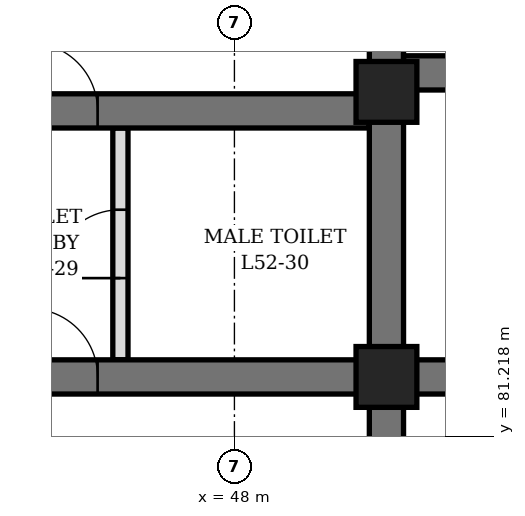
"""IFC4 building model, lengths in metres.
Left out: names, types, materials, properties, quantities, classifications, styles, units other than length and angle.
Written with IfcOpenShell. Run it as: python <this file> out.ifc"""

import sys

from ifc_helpers import new_model, si_unit, direction, frame, frame_2d, origin, origin_2d, place, context, subcontext, project, spatial, rectangle, hollow_rectangle, extrude, element, fill, save


model = new_model("IFC4")
c1 = context("Model", 3, precision=1e-05, world=origin(), true_north=direction((0.0, 1.0)))
c2 = subcontext(c1, "Body", "Model", "MODEL_VIEW")
j1 = project(units=[si_unit("LENGTHUNIT", "METRE"), si_unit("PLANEANGLEUNIT", "RADIAN")], contexts=[c1])
p1 = place(None, origin())
s1 = spatial("IfcSite", under=j1, at=p1, CompositionType="ELEMENT")
p2 = place(p1, origin())
s2 = spatial("IfcBuilding", under=s1, at=p2, CompositionType="ELEMENT")
p3 = place(p2, frame((0.0, 0.0, 231.7)))
s3 = spatial("IfcBuildingStorey", under=s2, at=p3, CompositionType="ELEMENT", Elevation=231.7)
p4 = place(p3, frame((50.0, 71.6, 0.0), z_axis=(0.0, 0.0, 1.0), x_axis=(0.0, 1.0, 0.0)))
e1 = element("IfcWall", 1, at=p4, inside=s3, PredefinedType="SHEAR", context=c2, shape_type="SweptSolid", body=[
    extrude(rectangle(XDim=16.8, YDim=0.45, at=frame_2d((8.4, 0.0))), origin(), (0.0, 0.0, 1.0), 4.2),
])
p5 = place(p4, frame((7.5, 0.0, 0.0)))
e2 = element("IfcOpeningElement", 2, at=p5, cuts=e1, PredefinedType="OPENING", context=c2, shape_type="SweptSolid", body=[
    extrude(rectangle(XDim=1.8, YDim=2.4, at=frame_2d((0.9, 1.2))), frame((0.0, 0.235, 0.0), z_axis=(0.0, -1.0, 0.0), x_axis=(1.0, 0.0, 0.0)), (0.0, 0.0, 1.0), 0.47),
])
p6 = place(p3, frame((44.6, 82.0, 0.0), z_axis=(0.0, 0.0, 1.0), x_axis=(1.0, 0.0, 0.0)))
e3 = element("IfcWall", 3, at=p6, inside=s3, PredefinedType="SHEAR", context=c2, shape_type="SweptSolid", body=[
    extrude(rectangle(XDim=5.175, YDim=0.45, at=frame_2d((2.587, 0.0))), origin(), (0.0, 0.0, 1.0), 4.2),
])
p7 = place(p6, frame((0.7, 0.0, 0.0)))
e4 = element("IfcOpeningElement", 4, at=p7, cuts=e3, PredefinedType="OPENING", context=c2, shape_type="SweptSolid", body=[
    extrude(rectangle(XDim=0.9, YDim=2.1, at=frame_2d((0.45, 1.05))), frame((0.0, 0.235, 0.0), z_axis=(0.0, -1.0, 0.0), x_axis=(1.0, 0.0, 0.0)), (0.0, 0.0, 1.0), 0.47),
])
p8 = place(p3, frame((44.6, 85.5, 0.0), z_axis=(0.0, 0.0, 1.0), x_axis=(1.0, 0.0, 0.0)))
e5 = element("IfcWall", 5, at=p8, inside=s3, PredefinedType="SHEAR", context=c2, shape_type="SweptSolid", body=[
    extrude(rectangle(XDim=5.175, YDim=0.45, at=frame_2d((2.587, 0.0))), origin(), (0.0, 0.0, 1.0), 4.2),
])
p9 = place(p8, frame((0.7, 0.0, 0.0)))
e6 = element("IfcOpeningElement", 6, at=p9, cuts=e5, PredefinedType="OPENING", context=c2, shape_type="SweptSolid", body=[
    extrude(rectangle(XDim=0.9, YDim=2.1, at=frame_2d((0.45, 1.05))), frame((0.0, 0.235, 0.0), z_axis=(0.0, -1.0, 0.0), x_axis=(1.0, 0.0, 0.0)), (0.0, 0.0, 1.0), 0.47),
])
p10 = place(p3, frame((50.225, 82.0, 0.0), z_axis=(0.0, 0.0, 1.0), x_axis=(1.0, 0.0, 0.0)))
e7 = element("IfcWall", 7, at=p10, inside=s3, PredefinedType="SHEAR", context=c2, shape_type="SweptSolid", body=[
    extrude(rectangle(XDim=11.55, YDim=0.45, at=frame_2d((5.775, 0.0))), origin(), (0.0, 0.0, 1.0), 4.2),
])
p11 = place(p10, frame((0.825, 0.0, 0.0)))
e8 = element("IfcOpeningElement", 8, at=p11, cuts=e7, PredefinedType="OPENING", context=c2, shape_type="SweptSolid", body=[
    extrude(rectangle(XDim=0.9, YDim=2.1, at=frame_2d((0.45, 1.05))), frame((0.0, 0.235, 0.0), z_axis=(0.0, -1.0, 0.0), x_axis=(1.0, 0.0, 0.0)), (0.0, 0.0, 1.0), 0.47),
])
p12 = place(p10, frame((3.825, 0.0, 0.0)))
e9 = element("IfcOpeningElement", 9, at=p12, cuts=e7, PredefinedType="OPENING", context=c2, shape_type="SweptSolid", body=[
    extrude(rectangle(XDim=0.9, YDim=2.1, at=frame_2d((0.45, 1.05))), frame((0.0, 0.235, 0.0), z_axis=(0.0, -1.0, 0.0), x_axis=(1.0, 0.0, 0.0)), (0.0, 0.0, 1.0), 0.47),
])
p13 = place(p10, frame((6.825, 0.0, 0.0)))
e10 = element("IfcOpeningElement", 10, at=p13, cuts=e7, PredefinedType="OPENING", context=c2, shape_type="SweptSolid", body=[
    extrude(rectangle(XDim=0.9, YDim=2.1, at=frame_2d((0.45, 1.05))), frame((0.0, 0.235, 0.0), z_axis=(0.0, -1.0, 0.0), x_axis=(1.0, 0.0, 0.0)), (0.0, 0.0, 1.0), 0.47),
])
p14 = place(p10, frame((9.825, 0.0, 0.0)))
e11 = element("IfcOpeningElement", 11, at=p14, cuts=e7, PredefinedType="OPENING", context=c2, shape_type="SweptSolid", body=[
    extrude(rectangle(XDim=0.9, YDim=2.1, at=frame_2d((0.45, 1.05))), frame((0.0, 0.235, 0.0), z_axis=(0.0, -1.0, 0.0), x_axis=(1.0, 0.0, 0.0)), (0.0, 0.0, 1.0), 0.47),
])
p15 = place(p3, frame((50.225, 86.0, 0.0), z_axis=(0.0, 0.0, 1.0), x_axis=(1.0, 0.0, 0.0)))
e12 = element("IfcWall", 12, at=p15, inside=s3, PredefinedType="SHEAR", context=c2, shape_type="SweptSolid", body=[
    extrude(rectangle(XDim=11.55, YDim=0.45, at=frame_2d((5.775, 0.0))), origin(), (0.0, 0.0, 1.0), 4.2),
])
for number, where, z_axis, x_axis in (
    (13, (50.0, 82.0, 0.0), (0.0, 0.0, 1.0), (1.0, 0.0, 0.0)),
    (14, (50.0, 85.75, 0.0), (0.0, 0.0, 1.0), (1.0, 0.0, 0.0)),
):
    element("IfcColumn", number, at=place(p3, frame(where, z_axis=z_axis, x_axis=x_axis)), inside=s3, PredefinedType="COLUMN", context=c2, shape_type="SweptSolid", body=[
        extrude(hollow_rectangle(XDim=0.8, YDim=0.8, WallThickness=0.1, at=origin_2d()), origin(), (0.0, 0.0, 1.0), 4.2),
    ])
p16 = place(p3, frame((46.5, 82.225, 0.0), z_axis=(0.0, 0.0, 1.0), x_axis=(0.0, 1.0, 0.0)))
e15 = element("IfcWall", 15, at=p16, inside=s3, PredefinedType="PARTITIONING", context=c2, shape_type="SweptSolid", body=[
    extrude(rectangle(XDim=3.05, YDim=0.2, at=frame_2d((1.525, 0.0))), origin(), (0.0, 0.0, 1.0), 4.04),
])
p17 = place(p16, frame((1.075, 0.0, 0.0)))
e16 = element("IfcOpeningElement", 16, at=p17, cuts=e15, PredefinedType="OPENING", context=c2, shape_type="SweptSolid", body=[
    extrude(rectangle(XDim=0.9, YDim=2.1, at=frame_2d((0.45, 1.05))), frame((0.0, 0.11, 0.0), z_axis=(0.0, -1.0, 0.0), x_axis=(1.0, 0.0, 0.0)), (0.0, 0.0, 1.0), 0.22),
])
p18 = place(p7, origin())
e17 = element("IfcDoor", 17, at=p18, inside=s3, OperationType="SINGLE_SWING_LEFT", PredefinedType="DOOR", context=c2, shape_type="SweptSolid", body=[
    extrude(rectangle(XDim=0.9, YDim=2.1, at=frame_2d((0.45, 1.05))), frame((0.0, 0.225, 0.0), z_axis=(0.0, -1.0, 0.0), x_axis=(1.0, 0.0, 0.0)), (0.0, 0.0, 1.0), 0.449),
])
fill(e4, e17)
p19 = place(p17, origin())
e18 = element("IfcDoor", 18, at=p19, inside=s3, OperationType="SINGLE_SWING_RIGHT", PredefinedType="DOOR", context=c2, shape_type="SweptSolid", body=[
    extrude(rectangle(XDim=0.9, YDim=2.1, at=frame_2d((0.45, 1.05))), frame((0.0, 0.1, 0.0), z_axis=(0.0, -1.0, 0.0), x_axis=(1.0, 0.0, 0.0)), (0.0, 0.0, 1.0), 0.199),
])
fill(e16, e18)
p20 = place(p9, origin())
e19 = element("IfcDoor", 19, at=p20, inside=s3, OperationType="SINGLE_SWING_RIGHT", PredefinedType="DOOR", context=c2, shape_type="SweptSolid", body=[
    extrude(rectangle(XDim=0.9, YDim=2.1, at=frame_2d((0.45, 1.05))), frame((0.0, 0.225, 0.0), z_axis=(0.0, -1.0, 0.0), x_axis=(1.0, 0.0, 0.0)), (0.0, 0.0, 1.0), 0.449),
])
fill(e6, e19)
save(model, sys.argv[1])
